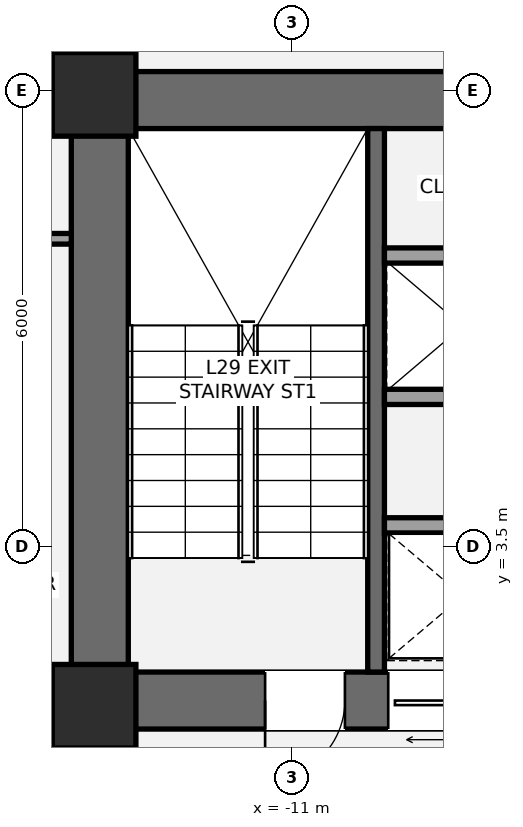
"""IFC4 building model, lengths in metres.
Left out: names, types, materials, properties, quantities, classifications, styles, units other than length and angle.
Written with IfcOpenShell. Run it as: python <this file> out.ifc"""

import sys

from ifc_helpers import new_model, si_unit, direction, frame, frame_2d, origin, origin_2d, place, context, subcontext, project, spatial, rectangle, extrude, element, fill, save


model = new_model("IFC4")
c1 = context("Model", 3, precision=1e-05, world=origin(), true_north=direction((0.0, 1.0)))
c2 = subcontext(c1, "Body", "Model", "MODEL_VIEW")
j1 = project(units=[si_unit("LENGTHUNIT", "METRE"), si_unit("PLANEANGLEUNIT", "RADIAN")], contexts=[c1])
p1 = place(None, origin())
s1 = spatial("IfcSite", under=j1, at=p1, CompositionType="ELEMENT")
p2 = place(p1, origin())
s2 = spatial("IfcBuilding", under=s1, at=p2, CompositionType="ELEMENT")
p3 = place(p2, frame((0.0, 0.0, 110.6)))
s3 = spatial("IfcBuildingStorey", under=s2, at=p3, CompositionType="ELEMENT", Elevation=110.6)
p4 = place(p3, frame((-13.525, 1.1, 0.0), z_axis=(0.0, 0.0, 1.0), x_axis=(0.0, 1.0, 0.0)))
e1 = element("IfcWall", 1, at=p4, inside=s3, PredefinedType="SHEAR", context=c2, shape_type="SweptSolid", body=[
    extrude(rectangle(XDim=8.65, YDim=0.75, at=frame_2d((4.325, 0.0))), origin(), (0.0, 0.0, 1.0), 3.5),
])
p5 = place(p3, frame((-13.9, 9.375, 0.0), z_axis=(0.0, 0.0, 1.0), x_axis=(1.0, 0.0, 0.0)))
e2 = element("IfcWall", 2, at=p5, inside=s3, PredefinedType="SHEAR", context=c2, shape_type="SweptSolid", body=[
    extrude(rectangle(XDim=9.475, YDim=0.75, at=frame_2d((4.737, 0.0))), origin(), (0.0, 0.0, 1.0), 3.5),
])
p6 = place(p3, frame((-4.825, 1.475, 0.0), z_axis=(0.0, 0.0, 1.0), x_axis=(-1.0, 0.0, 0.0)))
e3 = element("IfcWall", 3, at=p6, inside=s3, PredefinedType="SHEAR", context=c2, shape_type="SweptSolid", body=[
    extrude(rectangle(XDim=9.075, YDim=0.75, at=frame_2d((4.538, 0.0))), origin(), (0.0, 0.0, 1.0), 3.5),
])
p7 = place(p6, frame((5.475, 0.0, 0.0)))
e4 = element("IfcOpeningElement", 4, at=p7, cuts=e3, PredefinedType="OPENING", context=c2, shape_type="SweptSolid", body=[
    extrude(rectangle(XDim=1.05, YDim=2.15, at=frame_2d((0.525, 1.075))), frame((0.0, 0.385, 0.0), z_axis=(0.0, -1.0, 0.0), x_axis=(1.0, 0.0, 0.0)), (0.0, 0.0, 1.0), 0.77),
])
p8 = place(p6, frame((3.805, 0.0, 0.0)))
e5 = element("IfcOpeningElement", 5, at=p8, cuts=e3, PredefinedType="OPENING", context=c2, shape_type="SweptSolid", body=[
    extrude(rectangle(XDim=1.1, YDim=2.2, at=frame_2d((0.55, 1.1))), frame((0.0, 0.385, 0.0), z_axis=(0.0, -1.0, 0.0), x_axis=(1.0, 0.0, 0.0)), (0.0, 0.0, 1.0), 0.77),
])
p9 = place(p3, frame((-9.89, 1.85, 0.0), z_axis=(0.0, 0.0, 1.0), x_axis=(0.0, 1.0, 0.0)))
e6 = element("IfcWall", 6, at=p9, inside=s3, PredefinedType="SHEAR", context=c2, shape_type="SweptSolid", body=[
    extrude(rectangle(XDim=7.15, YDim=0.22, at=frame_2d((3.575, 0.0))), origin(), (0.0, 0.0, 1.0), 3.5),
])
for number, where, z_axis, x_axis in (
    (7, (-13.6, 1.4, 0.0), (0.0, 0.0, 1.0), (1.0, 0.0, 0.0)),
    (8, (-13.6, 9.45, 0.0), (0.0, 0.0, 1.0), (1.0, 0.0, 0.0)),
):
    element("IfcColumn", number, at=place(p3, frame(where, z_axis=z_axis, x_axis=x_axis)), inside=s3, PredefinedType="COLUMN", context=c2, shape_type="SweptSolid", body=[
        extrude(rectangle(XDim=1.1, YDim=1.1, at=origin_2d()), origin(), (0.0, 0.0, 1.0), 3.5),
    ])
p10 = place(p3, frame((-13.45, -2.15, 0.0), z_axis=(0.0, 0.0, 1.0), x_axis=(0.0, 1.0, 0.0)))
e9 = element("IfcWall", 9, at=p10, inside=s3, PredefinedType="PARTITIONING", context=c2, shape_type="SweptSolid", body=[
    extrude(rectangle(XDim=3.3, YDim=0.165, at=frame_2d((1.65, 0.0))), origin(), (0.0, 0.0, 1.0), 2.763),
])
p11 = place(p10, frame((1.15, 0.0, 0.0)))
e10 = element("IfcOpeningElement", 10, at=p11, cuts=e9, PredefinedType="OPENING", context=c2, shape_type="SweptSolid", body=[
    extrude(rectangle(XDim=1.05, YDim=2.15, at=frame_2d((0.525, 1.075))), frame((0.0, 0.093, 0.0), z_axis=(0.0, -1.0, 0.0), x_axis=(1.0, 0.0, 0.0)), (0.0, 0.0, 1.0), 0.185),
])
for number, where, z_axis, x_axis in (
    (11, (-9.78, 3.78, 0.0), (0.0, 0.0, 1.0), (1.0, 0.0, 0.0)),
    (12, (-9.78, 5.47, 0.0), (0.0, 0.0, 1.0), (1.0, 0.0, 0.0)),
    (13, (-9.78, 7.33, 0.0), (0.0, 0.0, 1.0), (1.0, 0.0, 0.0)),
):
    element("IfcWall", number, at=place(p3, frame(where, z_axis=z_axis, x_axis=x_axis)), inside=s3, PredefinedType="SOLIDWALL", context=c2, shape_type="SweptSolid", body=[
        extrude(rectangle(XDim=4.205, YDim=0.2, at=frame_2d((2.103, 0.0))), origin(), (0.0, 0.0, 1.0), 3.31),
    ])
p12 = place(p3, frame((-17.8, 7.55, 0.0), z_axis=(0.0, 0.0, 1.0), x_axis=(1.0, 0.0, 0.0)))
e14 = element("IfcWall", 14, at=p12, inside=s3, PredefinedType="PARTITIONING", context=c2, shape_type="SweptSolid", body=[
    extrude(rectangle(XDim=3.9, YDim=0.14, at=frame_2d((1.95, 0.0))), origin(), (0.0, 0.0, 1.0), 2.763),
])
p13 = place(p12, frame((0.32, 0.0, 0.0)))
e15 = element("IfcOpeningElement", 15, at=p13, cuts=e14, PredefinedType="OPENING", context=c2, shape_type="SweptSolid", body=[
    extrude(rectangle(XDim=0.92, YDim=2.15, at=frame_2d((0.46, 1.075))), frame((0.0, 0.08, 0.0), z_axis=(0.0, -1.0, 0.0), x_axis=(1.0, 0.0, 0.0)), (0.0, 0.0, 1.0), 0.16),
])
p14 = place(p7, origin())
e16 = element("IfcDoor", 16, at=p14, inside=s3, OperationType="SINGLE_SWING_RIGHT", PredefinedType="DOOR", context=c2, shape_type="SweptSolid", body=[
    extrude(rectangle(XDim=1.05, YDim=2.15, at=frame_2d((0.525, 1.075))), frame((0.0, 0.025, 0.0), z_axis=(0.0, -1.0, 0.0), x_axis=(1.0, 0.0, 0.0)), (0.0, 0.0, 1.0), 0.05),
])
fill(e4, e16)
p15 = place(p8, origin())
e17 = element("IfcDoor", 17, at=p15, inside=s3, OperationType="SLIDING_TO_LEFT", PredefinedType="DOOR", context=c2, shape_type="SweptSolid", body=[
    extrude(rectangle(XDim=1.1, YDim=2.2, at=frame_2d((0.55, 1.1))), frame((0.0, 0.025, 0.0), z_axis=(0.0, -1.0, 0.0), x_axis=(1.0, 0.0, 0.0)), (0.0, 0.0, 1.0), 0.05),
])
fill(e5, e17)
save(model, sys.argv[1])
